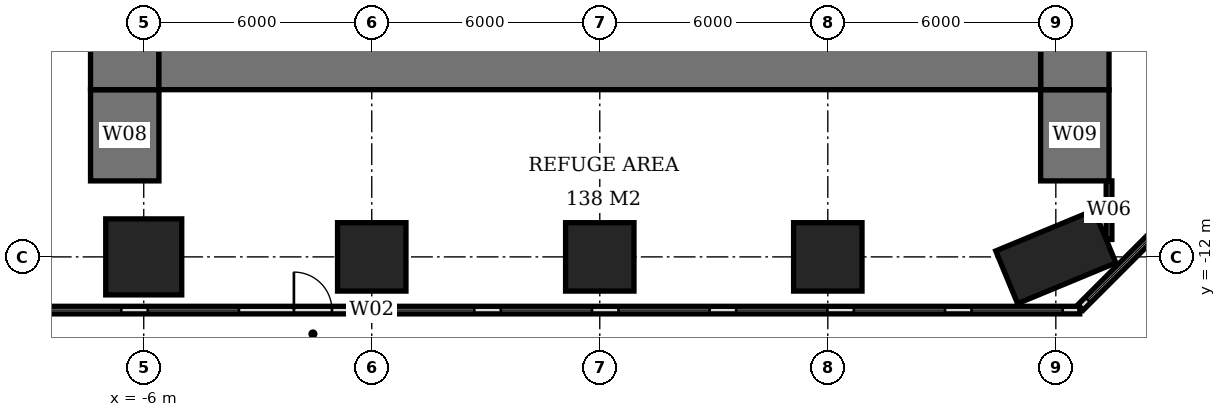
"""IFC4 building model, lengths in metres.
Left out: names, types, materials, properties, quantities, classifications, styles, units other than length and angle.
Written with IfcOpenShell. Run it as: python <this file> out.ifc"""

import sys

from ifc_helpers import new_model, si_unit, direction, frame, frame_2d, origin, origin_2d, place, context, subcontext, project, spatial, rectangle, extrude, element, fill, save


model = new_model("IFC4")
c1 = context("Model", 3, precision=1e-05, world=origin(), true_north=direction((0.0, 1.0)))
c2 = subcontext(c1, "Body", "Model", "MODEL_VIEW")
j1 = project(units=[si_unit("LENGTHUNIT", "METRE"), si_unit("PLANEANGLEUNIT", "RADIAN")], contexts=[c1])
p1 = place(None, origin())
s1 = spatial("IfcSite", under=j1, at=p1, CompositionType="ELEMENT")
p2 = place(p1, origin())
s2 = spatial("IfcBuilding", under=s1, at=p2, CompositionType="ELEMENT")
p3 = place(p2, frame((0.0, 0.0, 88.4)))
s3 = spatial("IfcBuildingStorey", under=s2, at=p3, CompositionType="ELEMENT", Elevation=88.4)
p4 = place(p3, frame((-6.0, -12.0, 0.0), z_axis=(0.0, 0.0, 1.0), x_axis=(1.0, 0.0, 0.0)))
e1 = element("IfcColumn", 1, at=p4, inside=s3, PredefinedType="COLUMN", context=c2, shape_type="SweptSolid", body=[
    extrude(rectangle(XDim=2.0, YDim=2.0, at=origin_2d()), origin(), (0.0, 0.0, 1.0), 5.4),
])
for number, where, z_axis, x_axis in (
    (2, (0.0, -12.0, 0.0), (0.0, 0.0, 1.0), (1.0, 0.0, 0.0)),
    (3, (6.0, -12.0, 0.0), (0.0, 0.0, 1.0), (1.0, 0.0, 0.0)),
    (4, (12.0, -12.0, 0.0), (0.0, 0.0, 1.0), (1.0, 0.0, 0.0)),
):
    element("IfcColumn", number, at=place(p3, frame(where, z_axis=z_axis, x_axis=x_axis)), inside=s3, PredefinedType="COLUMN", context=c2, shape_type="SweptSolid", body=[
        extrude(rectangle(XDim=1.8, YDim=1.8, at=origin_2d()), origin(), (0.0, 0.0, 1.0), 5.4),
    ])
p5 = place(p3, frame((18.0, -12.0, 0.0), z_axis=(0.0, 0.0, 1.0), x_axis=(-0.923879532511, -0.382683432365, 0.0)))
e5 = element("IfcColumn", 5, at=p5, inside=s3, PredefinedType="COLUMN", context=c2, shape_type="SweptSolid", body=[
    extrude(rectangle(XDim=2.8, YDim=1.5, at=origin_2d()), origin(), (0.0, 0.0, 1.0), 5.4),
])
p6 = place(p3, frame((-5.6, -6.6, 0.0), z_axis=(0.0, 0.0, 1.0), x_axis=(1.0, 0.0, 0.0)))
e6 = element("IfcWall", 6, at=p6, inside=s3, PredefinedType="SHEAR", context=c2, shape_type="SweptSolid", body=[
    extrude(rectangle(XDim=23.2, YDim=2.0, at=frame_2d((11.6, 0.0))), origin(), (0.0, 0.0, 1.0), 5.4),
])
p7 = place(p3, frame((-6.5, -7.6, 0.0), z_axis=(0.0, 0.0, 1.0), x_axis=(0.0, 1.0, 0.0)))
e7 = element("IfcWall", 7, at=p7, inside=s3, PredefinedType="SHEAR", context=c2, shape_type="SweptSolid", body=[
    extrude(rectangle(XDim=21.2, YDim=1.8, at=frame_2d((10.6, 0.0))), origin(), (0.0, 0.0, 1.0), 5.4),
])
p8 = place(p7, frame((7.8, 0.0, 0.0)))
e8 = element("IfcOpeningElement", 8, at=p8, cuts=e7, PredefinedType="OPENING", context=c2, shape_type="SweptSolid", body=[
    extrude(rectangle(XDim=1.8, YDim=2.4, at=frame_2d((0.9, 1.2))), frame((0.0, 0.91, 0.0), z_axis=(0.0, -1.0, 0.0), x_axis=(1.0, 0.0, 0.0)), (0.0, 0.0, 1.0), 1.82),
])
p9 = place(p3, frame((18.5, -7.6, 0.0), z_axis=(0.0, 0.0, 1.0), x_axis=(0.0, 1.0, 0.0)))
e9 = element("IfcWall", 9, at=p9, inside=s3, PredefinedType="SHEAR", context=c2, shape_type="SweptSolid", body=[
    extrude(rectangle(XDim=21.2, YDim=1.8, at=frame_2d((10.6, 0.0))), origin(), (0.0, 0.0, 1.0), 5.4),
])
p10 = place(p9, frame((9.2, 0.0, 0.0)))
e10 = element("IfcOpeningElement", 10, at=p10, cuts=e9, PredefinedType="OPENING", context=c2, shape_type="SweptSolid", body=[
    extrude(rectangle(XDim=1.8, YDim=2.4, at=frame_2d((0.9, 1.2))), frame((0.0, 0.91, 0.0), z_axis=(0.0, -1.0, 0.0), x_axis=(1.0, 0.0, 0.0)), (0.0, 0.0, 1.0), 1.82),
])
for number, where, z_axis, x_axis in (
    (11, (-6.5, -10.0, 0.0), (0.0, 0.0, 1.0), (0.0, 1.0, 0.0)),
    (12, (18.5, -10.0, 0.0), (0.0, 0.0, 1.0), (0.0, 1.0, 0.0)),
):
    element("IfcWall", number, at=place(p3, frame(where, z_axis=z_axis, x_axis=x_axis)), inside=s3, PredefinedType="SHEAR", context=c2, shape_type="SweptSolid", body=[
        extrude(rectangle(XDim=2.4, YDim=1.8, at=frame_2d((1.2, 0.0))), origin(), (0.0, 0.0, 1.0), 5.4),
    ])
p11 = place(p3, frame((-18.63, -13.4, 0.0), z_axis=(0.0, 0.0, 1.0), x_axis=(1.0, 0.0, 0.0)))
e13 = element("IfcWall", 13, at=p11, inside=s3, PredefinedType="USERDEFINED", context=c2, shape_type="SweptSolid", body=[
    extrude(rectangle(XDim=37.26, YDim=0.2, at=frame_2d((18.63, 0.0))), origin(), (0.0, 0.0, 1.0), 5.4),
])
p12 = place(p11, frame((0.348, 0.0, 0.6)))
e14 = element("IfcOpeningElement", 14, at=p12, cuts=e13, PredefinedType="OPENING", context=c2, shape_type="SweptSolid", body=[
    extrude(rectangle(XDim=2.4, YDim=3.0, at=frame_2d((1.2, 1.5))), frame((0.0, 0.11, 0.0), z_axis=(0.0, -1.0, 0.0), x_axis=(1.0, 0.0, 0.0)), (0.0, 0.0, 1.0), 0.22),
])
p13 = place(p11, frame((3.445, 0.0, 0.6)))
e15 = element("IfcOpeningElement", 15, at=p13, cuts=e13, PredefinedType="OPENING", context=c2, shape_type="SweptSolid", body=[
    extrude(rectangle(XDim=2.4, YDim=3.0, at=frame_2d((1.2, 1.5))), frame((0.0, 0.11, 0.0), z_axis=(0.0, -1.0, 0.0), x_axis=(1.0, 0.0, 0.0)), (0.0, 0.0, 1.0), 0.22),
])
p14 = place(p11, frame((6.542, 0.0, 0.6)))
e16 = element("IfcOpeningElement", 16, at=p14, cuts=e13, PredefinedType="OPENING", context=c2, shape_type="SweptSolid", body=[
    extrude(rectangle(XDim=2.4, YDim=3.0, at=frame_2d((1.2, 1.5))), frame((0.0, 0.11, 0.0), z_axis=(0.0, -1.0, 0.0), x_axis=(1.0, 0.0, 0.0)), (0.0, 0.0, 1.0), 0.22),
])
p15 = place(p11, frame((9.638, 0.0, 0.6)))
e17 = element("IfcOpeningElement", 17, at=p15, cuts=e13, PredefinedType="OPENING", context=c2, shape_type="SweptSolid", body=[
    extrude(rectangle(XDim=2.4, YDim=3.0, at=frame_2d((1.2, 1.5))), frame((0.0, 0.11, 0.0), z_axis=(0.0, -1.0, 0.0), x_axis=(1.0, 0.0, 0.0)), (0.0, 0.0, 1.0), 0.22),
])
p16 = place(p11, frame((12.735, 0.0, 0.6)))
e18 = element("IfcOpeningElement", 18, at=p16, cuts=e13, PredefinedType="OPENING", context=c2, shape_type="SweptSolid", body=[
    extrude(rectangle(XDim=2.4, YDim=3.0, at=frame_2d((1.2, 1.5))), frame((0.0, 0.11, 0.0), z_axis=(0.0, -1.0, 0.0), x_axis=(1.0, 0.0, 0.0)), (0.0, 0.0, 1.0), 0.22),
])
p17 = place(p11, frame((16.582, 0.0, 0.0)))
e19 = element("IfcOpeningElement", 19, at=p17, cuts=e13, PredefinedType="OPENING", context=c2, shape_type="SweptSolid", body=[
    extrude(rectangle(XDim=1.0, YDim=2.1, at=frame_2d((0.5, 1.05))), frame((0.0, 0.11, 0.0), z_axis=(0.0, -1.0, 0.0), x_axis=(1.0, 0.0, 0.0)), (0.0, 0.0, 1.0), 0.22),
])
p18 = place(p11, frame((18.928, 0.0, 0.6)))
e20 = element("IfcOpeningElement", 20, at=p18, cuts=e13, PredefinedType="OPENING", context=c2, shape_type="SweptSolid", body=[
    extrude(rectangle(XDim=2.4, YDim=3.0, at=frame_2d((1.2, 1.5))), frame((0.0, 0.11, 0.0), z_axis=(0.0, -1.0, 0.0), x_axis=(1.0, 0.0, 0.0)), (0.0, 0.0, 1.0), 0.22),
])
p19 = place(p11, frame((22.025, 0.0, 0.6)))
e21 = element("IfcOpeningElement", 21, at=p19, cuts=e13, PredefinedType="OPENING", context=c2, shape_type="SweptSolid", body=[
    extrude(rectangle(XDim=2.4, YDim=3.0, at=frame_2d((1.2, 1.5))), frame((0.0, 0.11, 0.0), z_axis=(0.0, -1.0, 0.0), x_axis=(1.0, 0.0, 0.0)), (0.0, 0.0, 1.0), 0.22),
])
p20 = place(p11, frame((25.122, 0.0, 0.6)))
e22 = element("IfcOpeningElement", 22, at=p20, cuts=e13, PredefinedType="OPENING", context=c2, shape_type="SweptSolid", body=[
    extrude(rectangle(XDim=2.4, YDim=3.0, at=frame_2d((1.2, 1.5))), frame((0.0, 0.11, 0.0), z_axis=(0.0, -1.0, 0.0), x_axis=(1.0, 0.0, 0.0)), (0.0, 0.0, 1.0), 0.22),
])
p21 = place(p11, frame((28.218, 0.0, 0.6)))
e23 = element("IfcOpeningElement", 23, at=p21, cuts=e13, PredefinedType="OPENING", context=c2, shape_type="SweptSolid", body=[
    extrude(rectangle(XDim=2.4, YDim=3.0, at=frame_2d((1.2, 1.5))), frame((0.0, 0.11, 0.0), z_axis=(0.0, -1.0, 0.0), x_axis=(1.0, 0.0, 0.0)), (0.0, 0.0, 1.0), 0.22),
])
p22 = place(p11, frame((31.315, 0.0, 0.6)))
e24 = element("IfcOpeningElement", 24, at=p22, cuts=e13, PredefinedType="OPENING", context=c2, shape_type="SweptSolid", body=[
    extrude(rectangle(XDim=2.4, YDim=3.0, at=frame_2d((1.2, 1.5))), frame((0.0, 0.11, 0.0), z_axis=(0.0, -1.0, 0.0), x_axis=(1.0, 0.0, 0.0)), (0.0, 0.0, 1.0), 0.22),
])
p23 = place(p11, frame((34.412, 0.0, 0.6)))
e25 = element("IfcOpeningElement", 25, at=p23, cuts=e13, PredefinedType="OPENING", context=c2, shape_type="SweptSolid", body=[
    extrude(rectangle(XDim=2.4, YDim=3.0, at=frame_2d((1.2, 1.5))), frame((0.0, 0.11, 0.0), z_axis=(0.0, -1.0, 0.0), x_axis=(1.0, 0.0, 0.0)), (0.0, 0.0, 1.0), 0.22),
])
p24 = place(p3, frame((18.651, -13.329, 0.0), z_axis=(0.0, 0.0, 1.0), x_axis=(0.707106781187, 0.707106781187, 0.0)))
e26 = element("IfcWall", 26, at=p24, inside=s3, PredefinedType="USERDEFINED", context=c2, shape_type="SweptSolid", body=[
    extrude(rectangle(XDim=9.445, YDim=0.2, at=frame_2d((4.723, 0.0))), origin(), (0.0, 0.0, 1.0), 5.4),
])
p25 = place(p24, frame((0.274, 0.0, 0.6)))
e27 = element("IfcOpeningElement", 27, at=p25, cuts=e26, PredefinedType="OPENING", context=c2, shape_type="SweptSolid", body=[
    extrude(rectangle(XDim=2.6, YDim=3.0, at=frame_2d((1.3, 1.5))), frame((0.0, 0.11, 0.0), z_axis=(0.0, -1.0, 0.0), x_axis=(1.0, 0.0, 0.0)), (0.0, 0.0, 1.0), 0.22),
])
p26 = place(p24, frame((3.423, 0.0, 0.6)))
e28 = element("IfcOpeningElement", 28, at=p26, cuts=e26, PredefinedType="OPENING", context=c2, shape_type="SweptSolid", body=[
    extrude(rectangle(XDim=2.6, YDim=3.0, at=frame_2d((1.3, 1.5))), frame((0.0, 0.11, 0.0), z_axis=(0.0, -1.0, 0.0), x_axis=(1.0, 0.0, 0.0)), (0.0, 0.0, 1.0), 0.22),
])
p27 = place(p24, frame((6.571, 0.0, 0.6)))
e29 = element("IfcOpeningElement", 29, at=p27, cuts=e26, PredefinedType="OPENING", context=c2, shape_type="SweptSolid", body=[
    extrude(rectangle(XDim=2.6, YDim=3.0, at=frame_2d((1.3, 1.5))), frame((0.0, 0.11, 0.0), z_axis=(0.0, -1.0, 0.0), x_axis=(1.0, 0.0, 0.0)), (0.0, 0.0, 1.0), 0.22),
])
p28 = place(p3, frame((19.4, -11.541, 0.0), z_axis=(0.0, 0.0, 1.0), x_axis=(0.0, 1.0, 0.0)))
e30 = element("IfcWall", 30, at=p28, inside=s3, PredefinedType="PARTITIONING", context=c2, shape_type="SweptSolid", body=[
    extrude(rectangle(XDim=1.541, YDim=0.15, at=frame_2d((0.77, 0.0))), origin(), (0.0, 0.0, 1.0), 5.15),
])
p29 = place(p15, origin())
e31 = element("IfcWindow", 31, at=p29, inside=s3, PartitioningType="SINGLE_PANEL", PredefinedType="USERDEFINED", context=c2, shape_type="SweptSolid", body=[
    extrude(rectangle(XDim=2.4, YDim=3.0, at=frame_2d((1.2, 1.5))), frame((0.0, 0.03, 0.0), z_axis=(0.0, -1.0, 0.0), x_axis=(1.0, 0.0, 0.0)), (0.0, 0.0, 1.0), 0.06),
])
fill(e17, e31)
p30 = place(p16, origin())
e32 = element("IfcWindow", 32, at=p30, inside=s3, PartitioningType="SINGLE_PANEL", PredefinedType="USERDEFINED", context=c2, shape_type="SweptSolid", body=[
    extrude(rectangle(XDim=2.4, YDim=3.0, at=frame_2d((1.2, 1.5))), frame((0.0, 0.03, 0.0), z_axis=(0.0, -1.0, 0.0), x_axis=(1.0, 0.0, 0.0)), (0.0, 0.0, 1.0), 0.06),
])
fill(e18, e32)
p31 = place(p17, origin())
e33 = element("IfcDoor", 33, at=p31, inside=s3, OperationType="SINGLE_SWING_LEFT", PredefinedType="DOOR", context=c2, shape_type="SweptSolid", body=[
    extrude(rectangle(XDim=1.0, YDim=2.1, at=frame_2d((0.5, 1.05))), frame((0.0, 0.025, 0.0), z_axis=(0.0, -1.0, 0.0), x_axis=(1.0, 0.0, 0.0)), (0.0, 0.0, 1.0), 0.05),
])
fill(e19, e33)
p32 = place(p18, origin())
e34 = element("IfcWindow", 34, at=p32, inside=s3, PartitioningType="SINGLE_PANEL", PredefinedType="USERDEFINED", context=c2, shape_type="SweptSolid", body=[
    extrude(rectangle(XDim=2.4, YDim=3.0, at=frame_2d((1.2, 1.5))), frame((0.0, 0.03, 0.0), z_axis=(0.0, -1.0, 0.0), x_axis=(1.0, 0.0, 0.0)), (0.0, 0.0, 1.0), 0.06),
])
fill(e20, e34)
p33 = place(p19, origin())
e35 = element("IfcWindow", 35, at=p33, inside=s3, PartitioningType="SINGLE_PANEL", PredefinedType="USERDEFINED", context=c2, shape_type="SweptSolid", body=[
    extrude(rectangle(XDim=2.4, YDim=3.0, at=frame_2d((1.2, 1.5))), frame((0.0, 0.03, 0.0), z_axis=(0.0, -1.0, 0.0), x_axis=(1.0, 0.0, 0.0)), (0.0, 0.0, 1.0), 0.06),
])
fill(e21, e35)
p34 = place(p20, origin())
e36 = element("IfcWindow", 36, at=p34, inside=s3, PartitioningType="SINGLE_PANEL", PredefinedType="USERDEFINED", context=c2, shape_type="SweptSolid", body=[
    extrude(rectangle(XDim=2.4, YDim=3.0, at=frame_2d((1.2, 1.5))), frame((0.0, 0.03, 0.0), z_axis=(0.0, -1.0, 0.0), x_axis=(1.0, 0.0, 0.0)), (0.0, 0.0, 1.0), 0.06),
])
fill(e22, e36)
p35 = place(p21, origin())
e37 = element("IfcWindow", 37, at=p35, inside=s3, PartitioningType="SINGLE_PANEL", PredefinedType="USERDEFINED", context=c2, shape_type="SweptSolid", body=[
    extrude(rectangle(XDim=2.4, YDim=3.0, at=frame_2d((1.2, 1.5))), frame((0.0, 0.03, 0.0), z_axis=(0.0, -1.0, 0.0), x_axis=(1.0, 0.0, 0.0)), (0.0, 0.0, 1.0), 0.06),
])
fill(e23, e37)
p36 = place(p22, origin())
e38 = element("IfcWindow", 38, at=p36, inside=s3, PartitioningType="SINGLE_PANEL", PredefinedType="USERDEFINED", context=c2, shape_type="SweptSolid", body=[
    extrude(rectangle(XDim=2.4, YDim=3.0, at=frame_2d((1.2, 1.5))), frame((0.0, 0.03, 0.0), z_axis=(0.0, -1.0, 0.0), x_axis=(1.0, 0.0, 0.0)), (0.0, 0.0, 1.0), 0.06),
])
fill(e24, e38)
p37 = place(p23, origin())
e39 = element("IfcWindow", 39, at=p37, inside=s3, PartitioningType="SINGLE_PANEL", PredefinedType="USERDEFINED", context=c2, shape_type="SweptSolid", body=[
    extrude(rectangle(XDim=2.4, YDim=3.0, at=frame_2d((1.2, 1.5))), frame((0.0, 0.03, 0.0), z_axis=(0.0, -1.0, 0.0), x_axis=(1.0, 0.0, 0.0)), (0.0, 0.0, 1.0), 0.06),
])
fill(e25, e39)
p38 = place(p25, origin())
e40 = element("IfcWindow", 40, at=p38, inside=s3, PartitioningType="SINGLE_PANEL", PredefinedType="USERDEFINED", context=c2, shape_type="SweptSolid", body=[
    extrude(rectangle(XDim=2.6, YDim=3.0, at=frame_2d((1.3, 1.5))), frame((0.0, 0.03, 0.0), z_axis=(0.0, -1.0, 0.0), x_axis=(1.0, 0.0, 0.0)), (0.0, 0.0, 1.0), 0.06),
])
fill(e27, e40)
save(model, sys.argv[1])
